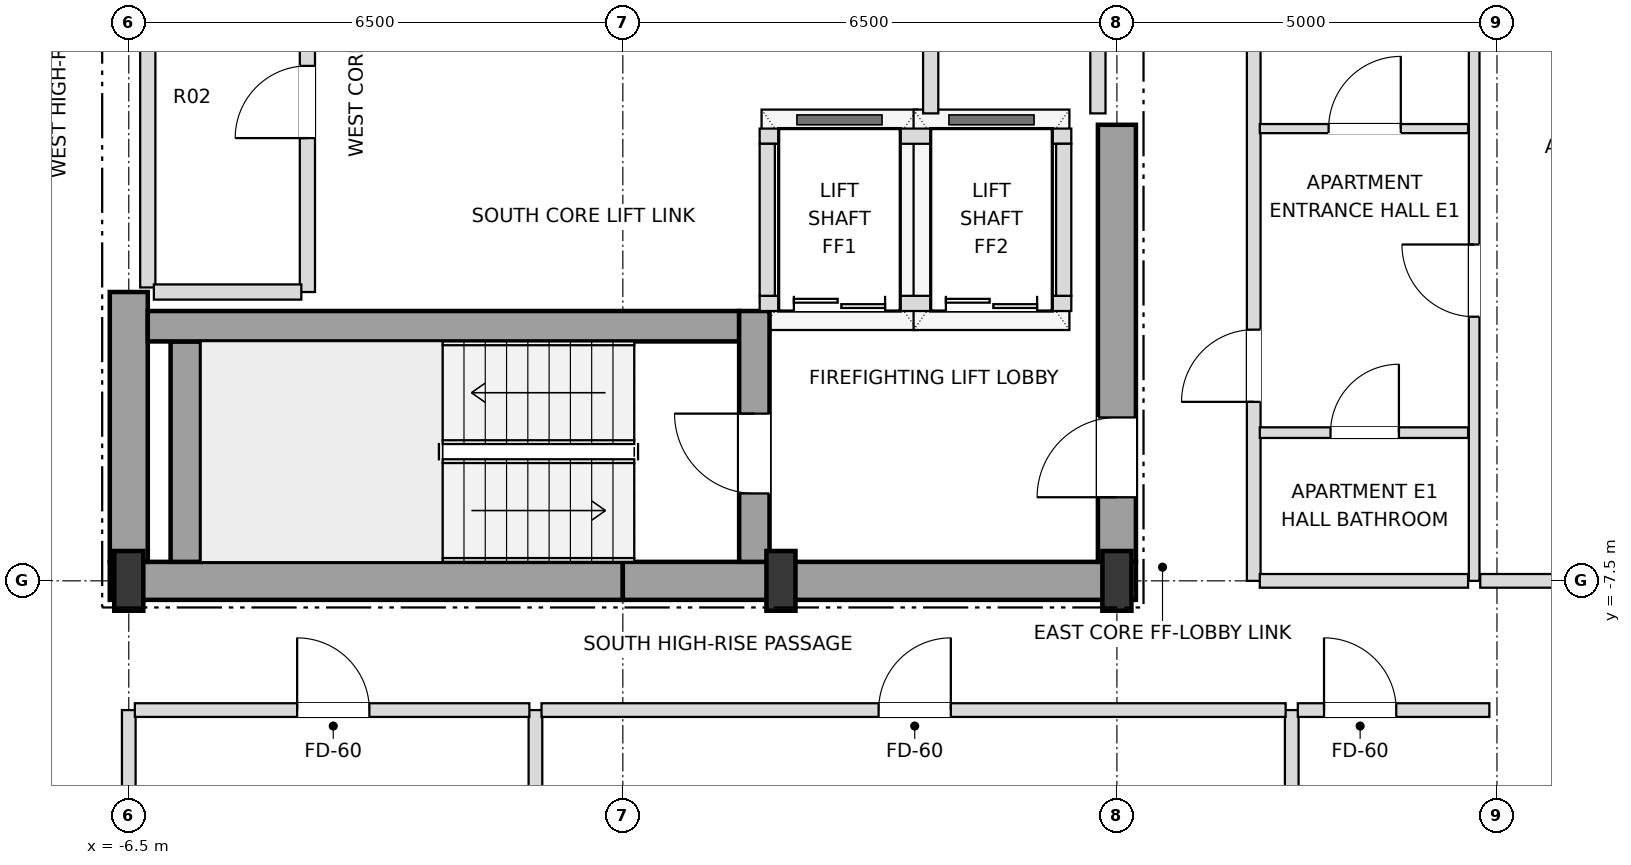
"""IFC4 building model, lengths in metres.
Left out: names, types, materials, properties, quantities, classifications, styles, units other than length and angle.
Written with IfcOpenShell. Run it as: python <this file> out.ifc"""

import sys

from ifc_helpers import new_model, si_unit, direction, frame, frame_2d, origin, origin_2d, place, context, subcontext, project, spatial, rectangle, i_section, extrude, element, fill, save


model = new_model("IFC4")
c1 = context("Model", 3, precision=1e-05, world=origin(), true_north=direction((0.0, 1.0)))
c2 = subcontext(c1, "Body", "Model", "MODEL_VIEW")
j1 = project(units=[si_unit("LENGTHUNIT", "METRE"), si_unit("PLANEANGLEUNIT", "RADIAN")], contexts=[c1])
p1 = place(None, origin())
s1 = spatial("IfcSite", under=j1, at=p1, CompositionType="ELEMENT")
p2 = place(p1, origin())
s2 = spatial("IfcBuilding", under=s1, at=p2, CompositionType="ELEMENT")
p3 = place(p2, frame((0.0, 0.0, 251.1)))
s3 = spatial("IfcBuildingStorey", under=s2, at=p3, CompositionType="ELEMENT", Elevation=251.1)
for number, where, z_axis, x_axis in (
    (1, (-6.5, -7.5, 0.0), (0.0, 0.0, 1.0), (1.0, 0.0, 0.0)),
    (2, (2.08, -7.5, 0.0), (0.0, 0.0, 1.0), (1.0, 0.0, 0.0)),
    (3, (6.5, -7.5, 0.0), (0.0, 0.0, 1.0), (1.0, 0.0, 0.0)),
):
    element("IfcColumn", number, at=place(p3, frame(where, z_axis=z_axis, x_axis=x_axis)), inside=s3, PredefinedType="COLUMN", context=c2, shape_type="SweptSolid", body=[
        extrude(i_section(OverallWidth=0.382, OverallDepth=0.786, WebThickness=0.02, FlangeThickness=0.033, at=origin_2d()), origin(), (0.0, 0.0, 1.0), 3.6),
    ])
for number, where, z_axis, x_axis in (
    (4, (-6.75, -7.5, 0.0), (0.0, 0.0, 1.0), (1.0, 0.0, 0.0)),
    (5, (0.0, -7.5, 0.0), (0.0, 0.0, 1.0), (1.0, 0.0, 0.0)),
):
    element("IfcWall", number, at=place(p3, frame(where, z_axis=z_axis, x_axis=x_axis)), inside=s3, PredefinedType="SHEAR", context=c2, shape_type="SweptSolid", body=[
        extrude(rectangle(XDim=6.75, YDim=0.5, at=frame_2d((3.375, 0.0))), origin(), (0.0, 0.0, 1.0), 3.38),
    ])
p4 = place(p3, frame((-6.5, -7.25, 0.0), z_axis=(0.0, 0.0, 1.0), x_axis=(0.0, 1.0, 0.0)))
e6 = element("IfcWall", 6, at=p4, inside=s3, PredefinedType="SHEAR", context=c2, shape_type="SweptSolid", body=[
    extrude(rectangle(XDim=3.55, YDim=0.5, at=frame_2d((1.775, 0.0))), origin(), (0.0, 0.0, 1.0), 3.38),
])
p5 = place(p3, frame((6.5, -7.25, 0.0), z_axis=(0.0, 0.0, 1.0), x_axis=(0.0, 1.0, 0.0)))
e7 = element("IfcWall", 7, at=p5, inside=s3, PredefinedType="SHEAR", context=c2, shape_type="SweptSolid", body=[
    extrude(rectangle(XDim=5.75, YDim=0.5, at=frame_2d((2.875, 0.0))), origin(), (0.0, 0.0, 1.0), 3.38),
])
p6 = place(p5, frame((0.85, 0.0, 0.0)))
e8 = element("IfcOpeningElement", 8, at=p6, cuts=e7, PredefinedType="OPENING", context=c2, shape_type="SweptSolid", body=[
    extrude(rectangle(XDim=1.05, YDim=2.15, at=frame_2d((0.525, 1.075))), frame((0.0, 0.26, 0.0), z_axis=(0.0, -1.0, 0.0), x_axis=(1.0, 0.0, 0.0)), (0.0, 0.0, 1.0), 0.52),
])
p7 = place(p3, frame((-5.75, -7.25, 0.0), z_axis=(0.0, 0.0, 1.0), x_axis=(0.0, 1.0, 0.0)))
e9 = element("IfcWall", 9, at=p7, inside=s3, PredefinedType="SHEAR", context=c2, shape_type="SweptSolid", body=[
    extrude(rectangle(XDim=2.9, YDim=0.4, at=frame_2d((1.45, 0.0))), origin(), (0.0, 0.0, 1.0), 3.38),
])
p8 = place(p3, frame((-6.25, -4.15, 0.0), z_axis=(0.0, 0.0, 1.0), x_axis=(1.0, 0.0, 0.0)))
e10 = element("IfcWall", 10, at=p8, inside=s3, PredefinedType="SHEAR", context=c2, shape_type="SweptSolid", body=[
    extrude(rectangle(XDim=7.78, YDim=0.4, at=frame_2d((3.89, 0.0))), origin(), (0.0, 0.0, 1.0), 3.38),
])
p9 = place(p3, frame((1.73, -7.25, 0.0), z_axis=(0.0, 0.0, 1.0), x_axis=(0.0, 1.0, 0.0)))
e11 = element("IfcWall", 11, at=p9, inside=s3, PredefinedType="SHEAR", context=c2, shape_type="SweptSolid", body=[
    extrude(rectangle(XDim=3.3, YDim=0.4, at=frame_2d((1.65, 0.0))), origin(), (0.0, 0.0, 1.0), 3.38),
])
p10 = place(p9, frame((0.9, 0.0, 0.0)))
e12 = element("IfcOpeningElement", 12, at=p10, cuts=e11, PredefinedType="OPENING", context=c2, shape_type="SweptSolid", body=[
    extrude(rectangle(XDim=1.05, YDim=2.15, at=frame_2d((0.525, 1.075))), frame((0.0, 0.21, 0.0), z_axis=(0.0, -1.0, 0.0), x_axis=(1.0, 0.0, 0.0)), (0.0, 0.0, 1.0), 0.42),
])
p11 = place(p3, frame((1.8, -3.85, 0.0), z_axis=(0.0, 0.0, 1.0), x_axis=(1.0, 0.0, 0.0)))
e13 = element("IfcWall", 13, at=p11, inside=s3, PredefinedType="SOLIDWALL", context=c2, shape_type="SweptSolid", body=[
    extrude(rectangle(XDim=4.1, YDim=0.2, at=frame_2d((2.05, 0.0))), origin(), (0.0, 0.0, 1.0), 3.38),
])
p12 = place(p11, frame((0.45, 0.0, 0.0)))
e14 = element("IfcOpeningElement", 14, at=p12, cuts=e13, PredefinedType="OPENING", context=c2, shape_type="SweptSolid", body=[
    extrude(rectangle(XDim=1.2, YDim=2.2, at=frame_2d((0.6, 1.1))), frame((0.0, 0.11, 0.0), z_axis=(0.0, -1.0, 0.0), x_axis=(1.0, 0.0, 0.0)), (0.0, 0.0, 1.0), 0.22),
])
p13 = place(p11, frame((2.45, 0.0, 0.0)))
e15 = element("IfcOpeningElement", 15, at=p13, cuts=e13, PredefinedType="OPENING", context=c2, shape_type="SweptSolid", body=[
    extrude(rectangle(XDim=1.2, YDim=2.2, at=frame_2d((0.6, 1.1))), frame((0.0, 0.11, 0.0), z_axis=(0.0, -1.0, 0.0), x_axis=(1.0, 0.0, 0.0)), (0.0, 0.0, 1.0), 0.22),
])
p14 = place(p3, frame((1.8, -1.65, 0.0), z_axis=(0.0, 0.0, 1.0), x_axis=(1.0, 0.0, 0.0)))
e16 = element("IfcWall", 16, at=p14, inside=s3, PredefinedType="SOLIDWALL", context=c2, shape_type="SweptSolid", body=[
    extrude(rectangle(XDim=4.1, YDim=0.2, at=frame_2d((2.05, 0.0))), origin(), (0.0, 0.0, 1.0), 3.38),
])
for number, where, z_axis, x_axis in (
    (17, (1.9, -3.75, 0.0), (0.0, 0.0, 1.0), (0.0, 1.0, 0.0)),
    (18, (5.8, -3.75, 0.0), (0.0, 0.0, 1.0), (0.0, 1.0, 0.0)),
):
    element("IfcWall", number, at=place(p3, frame(where, z_axis=z_axis, x_axis=x_axis)), inside=s3, PredefinedType="SOLIDWALL", context=c2, shape_type="SweptSolid", body=[
        extrude(rectangle(XDim=2.0, YDim=0.2, at=frame_2d((1.0, 0.0))), origin(), (0.0, 0.0, 1.0), 3.38),
    ])
p15 = place(p3, frame((-6.5, -19.9, 0.0), z_axis=(0.0, 0.0, 1.0), x_axis=(0.0, 1.0, 0.0)))
e19 = element("IfcWall", 19, at=p15, inside=s3, PredefinedType="PARTITIONING", context=c2, shape_type="SweptSolid", body=[
    extrude(rectangle(XDim=10.7, YDim=0.18, at=frame_2d((5.35, 0.0))), origin(), (0.0, 0.0, 1.0), 2.826),
])
p16 = place(p3, frame((-6.25, -3.64, 0.0), z_axis=(0.0, 0.0, 1.0), x_axis=(0.0, 1.0, 0.0)))
e20 = element("IfcWall", 20, at=p16, inside=s3, PredefinedType="SOLIDWALL", context=c2, shape_type="SweptSolid", body=[
    extrude(rectangle(XDim=7.34, YDim=0.2, at=frame_2d((3.67, 0.0))), origin(), (0.0, 0.0, 1.0), 3.38),
])
p17 = place(p3, frame((-4.15, -3.7, 0.0), z_axis=(0.0, 0.0, 1.0), x_axis=(0.0, 1.0, 0.0)))
e21 = element("IfcWall", 21, at=p17, inside=s3, PredefinedType="SOLIDWALL", context=c2, shape_type="SweptSolid", body=[
    extrude(rectangle(XDim=7.4, YDim=0.2, at=frame_2d((3.7, 0.0))), origin(), (0.0, 0.0, 1.0), 3.38),
])
p18 = place(p17, frame((2.025, 0.0, 0.0)))
e22 = element("IfcOpeningElement", 22, at=p18, cuts=e21, PredefinedType="OPENING", context=c2, shape_type="SweptSolid", body=[
    extrude(rectangle(XDim=0.95, YDim=2.15, at=frame_2d((0.475, 1.075))), frame((0.0, 0.11, 0.0), z_axis=(0.0, -1.0, 0.0), x_axis=(1.0, 0.0, 0.0)), (0.0, 0.0, 1.0), 0.22),
])
p19 = place(p17, frame((5.775, 0.0, 0.0)))
e23 = element("IfcOpeningElement", 23, at=p19, cuts=e21, PredefinedType="OPENING", context=c2, shape_type="SweptSolid", body=[
    extrude(rectangle(XDim=0.95, YDim=2.15, at=frame_2d((0.475, 1.075))), frame((0.0, 0.11, 0.0), z_axis=(0.0, -1.0, 0.0), x_axis=(1.0, 0.0, 0.0)), (0.0, 0.0, 1.0), 0.22),
])
p20 = place(p3, frame((-1.15, -19.9, 0.0), z_axis=(0.0, 0.0, 1.0), x_axis=(0.0, 1.0, 0.0)))
e24 = element("IfcWall", 24, at=p20, inside=s3, PredefinedType="PARTITIONING", context=c2, shape_type="SweptSolid", body=[
    extrude(rectangle(XDim=10.7, YDim=0.18, at=frame_2d((5.35, 0.0))), origin(), (0.0, 0.0, 1.0), 3.018),
])
p21 = place(p3, frame((4.05, -1.35, 0.0), z_axis=(0.0, 0.0, 1.0), x_axis=(0.0, 1.0, 0.0)))
e25 = element("IfcWall", 25, at=p21, inside=s3, PredefinedType="SOLIDWALL", context=c2, shape_type="SweptSolid", body=[
    extrude(rectangle(XDim=3.2, YDim=0.2, at=frame_2d((1.6, 0.0))), origin(), (0.0, 0.0, 1.0), 3.38),
])
p22 = place(p21, frame((1.125, 0.0, 0.0)))
e26 = element("IfcOpeningElement", 26, at=p22, cuts=e25, PredefinedType="OPENING", context=c2, shape_type="SweptSolid", body=[
    extrude(rectangle(XDim=0.95, YDim=2.15, at=frame_2d((0.475, 1.075))), frame((0.0, 0.11, 0.0), z_axis=(0.0, -1.0, 0.0), x_axis=(1.0, 0.0, 0.0)), (0.0, 0.0, 1.0), 0.22),
])
p23 = place(p3, frame((6.25, -1.35, 0.0), z_axis=(0.0, 0.0, 1.0), x_axis=(0.0, 1.0, 0.0)))
e27 = element("IfcWall", 27, at=p23, inside=s3, PredefinedType="SOLIDWALL", context=c2, shape_type="SweptSolid", body=[
    extrude(rectangle(XDim=3.2, YDim=0.2, at=frame_2d((1.6, 0.0))), origin(), (0.0, 0.0, 1.0), 3.38),
])
p24 = place(p3, frame((8.3, -7.5, 0.0), z_axis=(0.0, 0.0, 1.0), x_axis=(0.0, 1.0, 0.0)))
e28 = element("IfcWall", 28, at=p24, inside=s3, PredefinedType="PARTITIONING", context=c2, shape_type="SweptSolid", body=[
    extrude(rectangle(XDim=15.0, YDim=0.18, at=frame_2d((7.5, 0.0))), origin(), (0.0, 0.0, 1.0), 3.38),
])
p25 = place(p24, frame((2.355, 0.0, 0.0)))
e29 = element("IfcOpeningElement", 29, at=p25, cuts=e28, PredefinedType="OPENING", context=c2, shape_type="SweptSolid", body=[
    extrude(rectangle(XDim=0.95, YDim=2.15, at=frame_2d((0.475, 1.075))), frame((0.0, 0.1, 0.0), z_axis=(0.0, -1.0, 0.0), x_axis=(1.0, 0.0, 0.0)), (0.0, 0.0, 1.0), 0.2),
])
p26 = place(p3, frame((8.8, -19.9, 0.0), z_axis=(0.0, 0.0, 1.0), x_axis=(0.0, 1.0, 0.0)))
e30 = element("IfcWall", 30, at=p26, inside=s3, PredefinedType="PARTITIONING", context=c2, shape_type="SweptSolid", body=[
    extrude(rectangle(XDim=10.7, YDim=0.18, at=frame_2d((5.35, 0.0))), origin(), (0.0, 0.0, 1.0), 2.826),
])
p27 = place(p3, frame((11.2, -7.5, 0.0), z_axis=(0.0, 0.0, 1.0), x_axis=(0.0, 1.0, 0.0)))
e31 = element("IfcWall", 31, at=p27, inside=s3, PredefinedType="PARTITIONING", context=c2, shape_type="SweptSolid", body=[
    extrude(rectangle(XDim=15.0, YDim=0.14, at=frame_2d((7.5, 0.0))), origin(), (0.0, 0.0, 1.0), 3.38),
])
p28 = place(p27, frame((3.475, 0.0, 0.0)))
e32 = element("IfcOpeningElement", 32, at=p28, cuts=e31, PredefinedType="OPENING", context=c2, shape_type="SweptSolid", body=[
    extrude(rectangle(XDim=0.95, YDim=2.1, at=frame_2d((0.475, 1.05))), frame((0.0, 0.08, 0.0), z_axis=(0.0, -1.0, 0.0), x_axis=(1.0, 0.0, 0.0)), (0.0, 0.0, 1.0), 0.16),
])
p29 = place(p3, frame((-6.42, -9.2, 0.0), z_axis=(0.0, 0.0, 1.0), x_axis=(1.0, 0.0, 0.0)))
e33 = element("IfcWall", 33, at=p29, inside=s3, PredefinedType="PARTITIONING", context=c2, shape_type="SweptSolid", body=[
    extrude(rectangle(XDim=5.19, YDim=0.18, at=frame_2d((2.595, 0.0))), origin(), (0.0, 0.0, 1.0), 3.38),
])
p30 = place(p29, frame((2.135, 0.0, 0.0)))
e34 = element("IfcOpeningElement", 34, at=p30, cuts=e33, PredefinedType="OPENING", context=c2, shape_type="SweptSolid", body=[
    extrude(rectangle(XDim=0.95, YDim=2.15, at=frame_2d((0.475, 1.075))), frame((0.0, 0.1, 0.0), z_axis=(0.0, -1.0, 0.0), x_axis=(1.0, 0.0, 0.0)), (0.0, 0.0, 1.0), 0.2),
])
p31 = place(p3, frame((-1.07, -9.2, 0.0), z_axis=(0.0, 0.0, 1.0), x_axis=(1.0, 0.0, 0.0)))
e35 = element("IfcWall", 35, at=p31, inside=s3, PredefinedType="PARTITIONING", context=c2, shape_type="SweptSolid", body=[
    extrude(rectangle(XDim=9.79, YDim=0.18, at=frame_2d((4.895, 0.0))), origin(), (0.0, 0.0, 1.0), 2.826),
])
p32 = place(p31, frame((4.435, 0.0, 0.0)))
e36 = element("IfcOpeningElement", 36, at=p32, cuts=e35, PredefinedType="OPENING", context=c2, shape_type="SweptSolid", body=[
    extrude(rectangle(XDim=0.95, YDim=2.15, at=frame_2d((0.475, 1.075))), frame((0.0, 0.1, 0.0), z_axis=(0.0, -1.0, 0.0), x_axis=(1.0, 0.0, 0.0)), (0.0, 0.0, 1.0), 0.2),
])
p33 = place(p3, frame((8.88, -9.2, 0.0), z_axis=(0.0, 0.0, 1.0), x_axis=(1.0, 0.0, 0.0)))
e37 = element("IfcWall", 37, at=p33, inside=s3, PredefinedType="PARTITIONING", context=c2, shape_type="SweptSolid", body=[
    extrude(rectangle(XDim=2.52, YDim=0.18, at=frame_2d((1.26, 0.0))), origin(), (0.0, 0.0, 1.0), 3.38),
])
p34 = place(p33, frame((0.345, 0.0, 0.0)))
e38 = element("IfcOpeningElement", 38, at=p34, cuts=e37, PredefinedType="OPENING", context=c2, shape_type="SweptSolid", body=[
    extrude(rectangle(XDim=0.95, YDim=2.15, at=frame_2d((0.475, 1.075))), frame((0.0, 0.1, 0.0), z_axis=(0.0, -1.0, 0.0), x_axis=(1.0, 0.0, 0.0)), (0.0, 0.0, 1.0), 0.2),
])
p35 = place(p3, frame((8.38, -7.5, 0.0), z_axis=(0.0, 0.0, 1.0), x_axis=(1.0, 0.0, 0.0)))
e39 = element("IfcWall", 39, at=p35, inside=s3, PredefinedType="PARTITIONING", context=c2, shape_type="SweptSolid", body=[
    extrude(rectangle(XDim=2.74, YDim=0.18, at=frame_2d((1.37, 0.0))), origin(), (0.0, 0.0, 1.0), 2.826),
])
p36 = place(p3, frame((11.28, -7.5, 0.0), z_axis=(0.0, 0.0, 1.0), x_axis=(1.0, 0.0, 0.0)))
e40 = element("IfcWall", 40, at=p36, inside=s3, PredefinedType="PARTITIONING", context=c2, shape_type="SweptSolid", body=[
    extrude(rectangle(XDim=5.62, YDim=0.18, at=frame_2d((2.81, 0.0))), origin(), (0.0, 0.0, 1.0), 2.826),
])
p37 = place(p3, frame((8.38, -5.55, 0.0), z_axis=(0.0, 0.0, 1.0), x_axis=(1.0, 0.0, 0.0)))
e41 = element("IfcWall", 41, at=p37, inside=s3, PredefinedType="PARTITIONING", context=c2, shape_type="SweptSolid", body=[
    extrude(rectangle(XDim=2.74, YDim=0.14, at=frame_2d((1.37, 0.0))), origin(), (0.0, 0.0, 1.0), 3.38),
])
p38 = place(p37, frame((0.93, 0.0, 0.0)))
e42 = element("IfcOpeningElement", 42, at=p38, cuts=e41, PredefinedType="OPENING", context=c2, shape_type="SweptSolid", body=[
    extrude(rectangle(XDim=0.9, YDim=2.1, at=frame_2d((0.45, 1.05))), frame((0.0, 0.08, 0.0), z_axis=(0.0, -1.0, 0.0), x_axis=(1.0, 0.0, 0.0)), (0.0, 0.0, 1.0), 0.16),
])
p39 = place(p3, frame((-6.17, -3.7, 0.0), z_axis=(0.0, 0.0, 1.0), x_axis=(1.0, 0.0, 0.0)))
e43 = element("IfcWall", 43, at=p39, inside=s3, PredefinedType="SOLIDWALL", context=c2, shape_type="SweptSolid", body=[
    extrude(rectangle(XDim=1.94, YDim=0.2, at=frame_2d((0.97, 0.0))), origin(), (0.0, 0.0, 1.0), 3.38),
])
p40 = place(p3, frame((8.38, -1.55, 0.0), z_axis=(0.0, 0.0, 1.0), x_axis=(1.0, 0.0, 0.0)))
e44 = element("IfcWall", 44, at=p40, inside=s3, PredefinedType="PARTITIONING", context=c2, shape_type="SweptSolid", body=[
    extrude(rectangle(XDim=2.74, YDim=0.12, at=frame_2d((1.37, 0.0))), origin(), (0.0, 0.0, 1.0), 3.38),
])
p41 = place(p40, frame((0.905, 0.0, 0.0)))
e45 = element("IfcOpeningElement", 45, at=p41, cuts=e44, PredefinedType="OPENING", context=c2, shape_type="SweptSolid", body=[
    extrude(rectangle(XDim=0.95, YDim=2.1, at=frame_2d((0.475, 1.05))), frame((0.0, 0.07, 0.0), z_axis=(0.0, -1.0, 0.0), x_axis=(1.0, 0.0, 0.0)), (0.0, 0.0, 1.0), 0.14),
])
p42 = place(p6, origin())
e46 = element("IfcDoor", 46, at=p42, inside=s3, OperationType="SINGLE_SWING_LEFT", PredefinedType="DOOR", context=c2, shape_type="SweptSolid", body=[
    extrude(rectangle(XDim=1.05, YDim=2.15, at=frame_2d((0.525, 1.075))), frame((0.0, 0.025, 0.0), z_axis=(0.0, -1.0, 0.0), x_axis=(1.0, 0.0, 0.0)), (0.0, 0.0, 1.0), 0.05),
])
fill(e8, e46)
p43 = place(p10, origin())
e47 = element("IfcDoor", 47, at=p43, inside=s3, OperationType="SINGLE_SWING_RIGHT", PredefinedType="DOOR", context=c2, shape_type="SweptSolid", body=[
    extrude(rectangle(XDim=1.05, YDim=2.15, at=frame_2d((0.525, 1.075))), frame((0.0, 0.025, 0.0), z_axis=(0.0, -1.0, 0.0), x_axis=(1.0, 0.0, 0.0)), (0.0, 0.0, 1.0), 0.05),
])
fill(e12, e47)
p44 = place(p12, origin())
e48 = element("IfcDoor", 48, at=p44, inside=s3, OperationType="DOUBLE_DOOR_SLIDING", PredefinedType="DOOR", context=c2, shape_type="SweptSolid", body=[
    extrude(rectangle(XDim=1.2, YDim=2.2, at=frame_2d((0.6, 1.1))), frame((0.0, 0.025, 0.0), z_axis=(0.0, -1.0, 0.0), x_axis=(1.0, 0.0, 0.0)), (0.0, 0.0, 1.0), 0.05),
])
fill(e14, e48)
p45 = place(p13, origin())
e49 = element("IfcDoor", 49, at=p45, inside=s3, OperationType="DOUBLE_DOOR_SLIDING", PredefinedType="DOOR", context=c2, shape_type="SweptSolid", body=[
    extrude(rectangle(XDim=1.2, YDim=2.2, at=frame_2d((0.6, 1.1))), frame((0.0, 0.025, 0.0), z_axis=(0.0, -1.0, 0.0), x_axis=(1.0, 0.0, 0.0)), (0.0, 0.0, 1.0), 0.05),
])
fill(e15, e49)
p46 = place(p18, origin())
e50 = element("IfcDoor", 50, at=p46, inside=s3, OperationType="SINGLE_SWING_LEFT", PredefinedType="DOOR", context=c2, shape_type="SweptSolid", body=[
    extrude(rectangle(XDim=0.95, YDim=2.15, at=frame_2d((0.475, 1.075))), frame((0.0, 0.025, 0.0), z_axis=(0.0, -1.0, 0.0), x_axis=(1.0, 0.0, 0.0)), (0.0, 0.0, 1.0), 0.05),
])
fill(e22, e50)
p47 = place(p30, origin())
e51 = element("IfcDoor", 51, at=p47, inside=s3, OperationType="SINGLE_SWING_LEFT", PredefinedType="DOOR", context=c2, shape_type="SweptSolid", body=[
    extrude(rectangle(XDim=0.95, YDim=2.15, at=frame_2d((0.475, 1.075))), frame((0.0, 0.025, 0.0), z_axis=(0.0, -1.0, 0.0), x_axis=(1.0, 0.0, 0.0)), (0.0, 0.0, 1.0), 0.05),
])
fill(e34, e51)
p48 = place(p32, origin())
e52 = element("IfcDoor", 52, at=p48, inside=s3, OperationType="SINGLE_SWING_RIGHT", PredefinedType="DOOR", context=c2, shape_type="SweptSolid", body=[
    extrude(rectangle(XDim=0.95, YDim=2.15, at=frame_2d((0.475, 1.075))), frame((0.0, 0.025, 0.0), z_axis=(0.0, -1.0, 0.0), x_axis=(1.0, 0.0, 0.0)), (0.0, 0.0, 1.0), 0.05),
])
fill(e36, e52)
p49 = place(p34, origin())
e53 = element("IfcDoor", 53, at=p49, inside=s3, OperationType="SINGLE_SWING_LEFT", PredefinedType="DOOR", context=c2, shape_type="SweptSolid", body=[
    extrude(rectangle(XDim=0.95, YDim=2.15, at=frame_2d((0.475, 1.075))), frame((0.0, 0.025, 0.0), z_axis=(0.0, -1.0, 0.0), x_axis=(1.0, 0.0, 0.0)), (0.0, 0.0, 1.0), 0.05),
])
fill(e38, e53)
p50 = place(p38, origin())
e54 = element("IfcDoor", 54, at=p50, inside=s3, OperationType="SINGLE_SWING_RIGHT", PredefinedType="DOOR", context=c2, shape_type="SweptSolid", body=[
    extrude(rectangle(XDim=0.9, YDim=2.1, at=frame_2d((0.45, 1.05))), frame((0.0, 0.025, 0.0), z_axis=(0.0, -1.0, 0.0), x_axis=(1.0, 0.0, 0.0)), (0.0, 0.0, 1.0), 0.05),
])
fill(e42, e54)
p51 = place(p25, origin())
e55 = element("IfcDoor", 55, at=p51, inside=s3, OperationType="SINGLE_SWING_LEFT", PredefinedType="DOOR", context=c2, shape_type="SweptSolid", body=[
    extrude(rectangle(XDim=0.95, YDim=2.15, at=frame_2d((0.475, 1.075))), frame((0.0, 0.025, 0.0), z_axis=(0.0, -1.0, 0.0), x_axis=(1.0, 0.0, 0.0)), (0.0, 0.0, 1.0), 0.05),
])
fill(e29, e55)
p52 = place(p41, origin())
e56 = element("IfcDoor", 56, at=p52, inside=s3, OperationType="SINGLE_SWING_RIGHT", PredefinedType="DOOR", context=c2, shape_type="SweptSolid", body=[
    extrude(rectangle(XDim=0.95, YDim=2.1, at=frame_2d((0.475, 1.05))), frame((0.0, 0.025, 0.0), z_axis=(0.0, -1.0, 0.0), x_axis=(1.0, 0.0, 0.0)), (0.0, 0.0, 1.0), 0.05),
])
fill(e45, e56)
p53 = place(p28, origin())
e57 = element("IfcDoor", 57, at=p53, inside=s3, OperationType="SINGLE_SWING_RIGHT", PredefinedType="DOOR", context=c2, shape_type="SweptSolid", body=[
    extrude(rectangle(XDim=0.95, YDim=2.1, at=frame_2d((0.475, 1.05))), frame((0.0, 0.025, 0.0), z_axis=(0.0, -1.0, 0.0), x_axis=(1.0, 0.0, 0.0)), (0.0, 0.0, 1.0), 0.05),
])
fill(e32, e57)
save(model, sys.argv[1])
